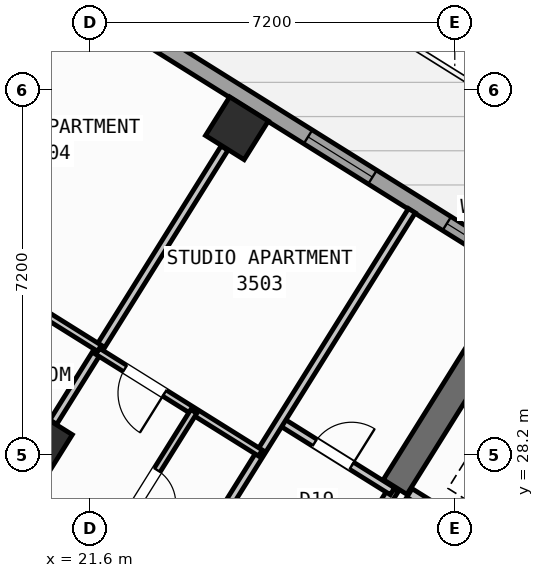
"""IFC4 building model, lengths in metres.
Left out: names, types, materials, properties, quantities, classifications, styles, units other than length and angle.
Written with IfcOpenShell. Run it as: python <this file> out.ifc"""

import sys

from ifc_helpers import new_model, si_unit, direction, frame, frame_2d, origin, origin_2d, place, context, subcontext, project, spatial, rectangle, hollow_rectangle, extrude, source, transform, mapped, element, fill, save


model = new_model("IFC4")
c1 = context("Model", 3, precision=1e-05, world=origin(), true_north=direction((0.0, 1.0)))
c2 = subcontext(c1, "Body", "Model", "MODEL_VIEW")
j1 = project(units=[si_unit("LENGTHUNIT", "METRE"), si_unit("PLANEANGLEUNIT", "RADIAN")], contexts=[c1])
p1 = place(None, origin())
s1 = spatial("IfcSite", under=j1, at=p1, CompositionType="ELEMENT")
p2 = place(p1, origin())
s2 = spatial("IfcBuilding", under=s1, at=p2, CompositionType="ELEMENT")
p3 = place(p2, frame((0.0, 0.0, 140.7)))
s3 = spatial("IfcBuildingStorey", under=s2, at=p3, CompositionType="ELEMENT", Elevation=140.7)
p4 = place(p3, frame((29.517, 30.594, 0.0), z_axis=(0.0, 0.0, 1.0), x_axis=(-0.529906864564, -0.848055844204, 0.0)))
e1 = element("IfcWall", 1, at=p4, inside=s3, PredefinedType="SHEAR", context=c2, shape_type="SweptSolid", body=[
    extrude(rectangle(XDim=3.575, YDim=0.55, at=frame_2d((1.788, 0.0))), origin(), (0.0, 0.0, 1.0), 3.35),
])
m1 = source(origin(), c2, "Body", "SweptSolid", [
    extrude(hollow_rectangle(XDim=0.9, YDim=0.9, WallThickness=0.036, at=origin_2d()), origin(), (0.0, 0.0, 1.0), 3.6),
])
for number, where, z_axis, x_axis in (
    (2, (24.5, 34.643, 0.0), (0.0, 0.0, 1.0), (-0.848, 0.53, 0.0)),
    (3, (20.632, 28.452, 0.0), (0.0, 0.0, 1.0), (-0.848, 0.53, 0.0)),
):
    element("IfcColumn", number, at=place(p3, frame(where, z_axis=z_axis, x_axis=x_axis)), inside=s3, PredefinedType="COLUMN", context=c2, shape_type="MappedRepresentation", body=[
        mapped(m1, transform((0.0, 0.0, 0.0), scale=1.0)),
    ])
p5 = place(p3, frame((14.138, 41.825, 0.0), z_axis=(0.0, 0.0, 1.0), x_axis=(0.848046498049, -0.529921821731, 0.0)))
e4 = element("IfcWall", 4, at=p5, inside=s3, PredefinedType="STANDARD", context=c2, shape_type="SweptSolid", body=[
    extrude(rectangle(XDim=31.588, YDim=0.32, at=frame_2d((15.794, 0.0))), origin(), (0.0, 0.0, 1.0), 3.35),
])
p6 = place(p5, frame((2.949, 0.0, 0.0)))
e5 = element("IfcOpeningElement", 5, at=p6, cuts=e4, PredefinedType="OPENING", context=c2, shape_type="SweptSolid", body=[
    extrude(rectangle(XDim=1.05, YDim=2.15, at=frame_2d((0.525, 1.075))), frame((0.0, 0.17, 0.0), z_axis=(0.0, -1.0, 0.0), x_axis=(1.0, 0.0, 0.0)), (0.0, 0.0, 1.0), 0.34),
])
p7 = place(p5, frame((0.861, 0.0, 0.85)))
e6 = element("IfcOpeningElement", 6, at=p7, cuts=e4, PredefinedType="OPENING", context=c2, shape_type="SweptSolid", body=[
    extrude(rectangle(XDim=1.5, YDim=1.5, at=frame_2d((0.75, 0.75))), frame((0.0, 0.17, 0.0), z_axis=(0.0, -1.0, 0.0), x_axis=(1.0, 0.0, 0.0)), (0.0, 0.0, 1.0), 0.34),
])
p8 = place(p5, frame((8.494, 0.0, 0.85)))
e7 = element("IfcOpeningElement", 7, at=p8, cuts=e4, PredefinedType="OPENING", context=c2, shape_type="SweptSolid", body=[
    extrude(rectangle(XDim=1.8, YDim=1.5, at=frame_2d((0.9, 0.75))), frame((0.0, 0.17, 0.0), z_axis=(0.0, -1.0, 0.0), x_axis=(1.0, 0.0, 0.0)), (0.0, 0.0, 1.0), 0.34),
])
p9 = place(p5, frame((13.874, 0.0, 0.85)))
e8 = element("IfcOpeningElement", 8, at=p9, cuts=e4, PredefinedType="OPENING", context=c2, shape_type="SweptSolid", body=[
    extrude(rectangle(XDim=1.5, YDim=1.5, at=frame_2d((0.75, 0.75))), frame((0.0, 0.17, 0.0), z_axis=(0.0, -1.0, 0.0), x_axis=(1.0, 0.0, 0.0)), (0.0, 0.0, 1.0), 0.34),
])
p10 = place(p5, frame((17.104, 0.0, 1.0)))
e9 = element("IfcOpeningElement", 9, at=p10, cuts=e4, PredefinedType="OPENING", context=c2, shape_type="SweptSolid", body=[
    extrude(rectangle(XDim=0.9, YDim=1.25, at=frame_2d((0.45, 0.625))), frame((0.0, 0.17, 0.0), z_axis=(0.0, -1.0, 0.0), x_axis=(1.0, 0.0, 0.0)), (0.0, 0.0, 1.0), 0.34),
])
p11 = place(p5, frame((22.144, 0.0, 1.0)))
e10 = element("IfcOpeningElement", 10, at=p11, cuts=e4, PredefinedType="OPENING", context=c2, shape_type="SweptSolid", body=[
    extrude(rectangle(XDim=0.9, YDim=1.25, at=frame_2d((0.45, 0.625))), frame((0.0, 0.17, 0.0), z_axis=(0.0, -1.0, 0.0), x_axis=(1.0, 0.0, 0.0)), (0.0, 0.0, 1.0), 0.34),
])
p12 = place(p5, frame((27.744, 0.0, 1.0)))
e11 = element("IfcOpeningElement", 11, at=p12, cuts=e4, PredefinedType="OPENING", context=c2, shape_type="SweptSolid", body=[
    extrude(rectangle(XDim=0.9, YDim=1.25, at=frame_2d((0.45, 0.625))), frame((0.0, 0.17, 0.0), z_axis=(0.0, -1.0, 0.0), x_axis=(1.0, 0.0, 0.0)), (0.0, 0.0, 1.0), 0.34),
])
p13 = place(p3, frame((31.822, 24.998, 0.0), z_axis=(0.0, 0.0, 1.0), x_axis=(-0.848036912365, 0.52993716162, 0.0)))
e12 = element("IfcWall", 12, at=p13, inside=s3, PredefinedType="STANDARD", context=c2, shape_type="SweptSolid", body=[
    extrude(rectangle(XDim=4.618, YDim=0.2, at=frame_2d((2.309, 0.0))), origin(), (0.0, 0.0, 1.0), 3.34),
])
p14 = place(p3, frame((27.596, 27.52, 0.0), z_axis=(0.0, 0.0, 1.0), x_axis=(-0.529865479138, -0.848081702443, 0.0)))
e13 = element("IfcWall", 13, at=p14, inside=s3, PredefinedType="STANDARD", context=c2, shape_type="SweptSolid", body=[
    extrude(rectangle(XDim=2.96, YDim=0.2, at=frame_2d((1.48, 0.0))), origin(), (0.0, 0.0, 1.0), 3.34),
])
p15 = place(p14, frame((1.76, 0.0, 0.0)))
e14 = element("IfcOpeningElement", 14, at=p15, cuts=e13, PredefinedType="OPENING", context=c2, shape_type="SweptSolid", body=[
    extrude(rectangle(XDim=0.86, YDim=2.05, at=frame_2d((0.43, 1.025))), frame((0.0, 0.11, 0.0), z_axis=(0.0, -1.0, 0.0), x_axis=(1.0, 0.0, 0.0)), (0.0, 0.0, 1.0), 0.22),
])
p16 = place(p3, frame((27.57, 27.478, 0.0), z_axis=(0.0, 0.0, 1.0), x_axis=(-0.848050851465, 0.529914854792, 0.0)))
e15 = element("IfcWall", 15, at=p16, inside=s3, PredefinedType="PARTITIONING", context=c2, shape_type="SweptSolid", body=[
    extrude(rectangle(XDim=2.61, YDim=0.16, at=frame_2d((1.305, 0.0))), origin(), (0.0, 0.0, 1.0), 3.34),
])
p17 = place(p16, frame((0.95, 0.0, 0.0)))
e16 = element("IfcOpeningElement", 16, at=p17, cuts=e15, PredefinedType="OPENING", context=c2, shape_type="SweptSolid", body=[
    extrude(rectangle(XDim=0.86, YDim=2.05, at=frame_2d((0.43, 1.025))), frame((0.0, 0.09, 0.0), z_axis=(0.0, -1.0, 0.0), x_axis=(1.0, 0.0, 0.0)), (0.0, 0.0, 1.0), 0.18),
])
p18 = place(p3, frame((27.953, 33.016, 0.0), z_axis=(0.0, 0.0, 1.0), x_axis=(-0.529903001606, -0.848058257957, 0.0)))
e17 = element("IfcWall", 17, at=p18, inside=s3, PredefinedType="PARTITIONING", context=c2, shape_type="SweptSolid", body=[
    extrude(rectangle(XDim=9.15, YDim=0.16, at=frame_2d((4.575, 0.0))), origin(), (0.0, 0.0, 1.0), 3.34),
])
p19 = place(p3, frame((23.104, 25.256, 0.0), z_axis=(0.0, 0.0, 1.0), x_axis=(-0.848041752158, 0.529929416617, 0.0)))
e18 = element("IfcWall", 18, at=p19, inside=s3, PredefinedType="PARTITIONING", context=c2, shape_type="SweptSolid", body=[
    extrude(rectangle(XDim=16.73, YDim=0.16, at=frame_2d((8.365, 0.0))), origin(), (0.0, 0.0, 1.0), 3.34),
])
p20 = place(p19, frame((2.22, 0.0, 0.0)))
e19 = element("IfcOpeningElement", 19, at=p20, cuts=e18, PredefinedType="OPENING", context=c2, shape_type="SweptSolid", body=[
    extrude(rectangle(XDim=0.86, YDim=2.05, at=frame_2d((0.43, 1.025))), frame((0.0, 0.09, 0.0), z_axis=(0.0, -1.0, 0.0), x_axis=(1.0, 0.0, 0.0)), (0.0, 0.0, 1.0), 0.18),
])
p21 = place(p19, frame((12.084, 0.0, 0.0)))
e20 = element("IfcOpeningElement", 20, at=p21, cuts=e18, PredefinedType="OPENING", context=c2, shape_type="SweptSolid", body=[
    extrude(rectangle(XDim=1.0, YDim=2.1, at=frame_2d((0.5, 1.05))), frame((0.0, 0.09, 0.0), z_axis=(0.0, -1.0, 0.0), x_axis=(1.0, 0.0, 0.0)), (0.0, 0.0, 1.0), 0.18),
])
p22 = place(p3, frame((21.938, 23.391, 0.0), z_axis=(0.0, 0.0, 1.0), x_axis=(-0.848045850158, 0.529922858565, 0.0)))
e21 = element("IfcWall", 21, at=p22, inside=s3, PredefinedType="PARTITIONING", context=c2, shape_type="SweptSolid", body=[
    extrude(rectangle(XDim=16.73, YDim=0.16, at=frame_2d((8.365, 0.0))), origin(), (0.0, 0.0, 1.0), 3.34),
])
p23 = place(p22, frame((2.22, 0.0, 0.0)))
e22 = element("IfcOpeningElement", 22, at=p23, cuts=e21, PredefinedType="OPENING", context=c2, shape_type="SweptSolid", body=[
    extrude(rectangle(XDim=0.86, YDim=2.05, at=frame_2d((0.43, 1.025))), frame((0.0, 0.09, 0.0), z_axis=(0.0, -1.0, 0.0), x_axis=(1.0, 0.0, 0.0)), (0.0, 0.0, 1.0), 0.18),
])
p24 = place(p22, frame((14.22, 0.0, 0.0)))
e23 = element("IfcOpeningElement", 23, at=p24, cuts=e21, PredefinedType="OPENING", context=c2, shape_type="SweptSolid", body=[
    extrude(rectangle(XDim=1.0, YDim=2.1, at=frame_2d((0.5, 1.05))), frame((0.0, 0.09, 0.0), z_axis=(0.0, -1.0, 0.0), x_axis=(1.0, 0.0, 0.0)), (0.0, 0.0, 1.0), 0.18),
])
p25 = place(p3, frame((24.256, 34.251, 0.0), z_axis=(0.0, 0.0, 1.0), x_axis=(-0.529919772691, -0.848047778437, 0.0)))
e24 = element("IfcWall", 24, at=p25, inside=s3, PredefinedType="PARTITIONING", context=c2, shape_type="SweptSolid", body=[
    extrude(rectangle(XDim=6.376, YDim=0.16, at=frame_2d((3.188, 0.0))), origin(), (0.0, 0.0, 1.0), 2.775),
])
p26 = place(p3, frame((24.964, 28.233, 0.0), z_axis=(0.0, 0.0, 1.0), x_axis=(-0.848059820872, 0.529900500304, 0.0)))
e25 = element("IfcWall", 25, at=p26, inside=s3, PredefinedType="PLUMBINGWALL", context=c2, shape_type="SweptSolid", body=[
    extrude(rectangle(XDim=3.79, YDim=0.14, at=frame_2d((1.895, 0.0))), origin(), (0.0, 0.0, 1.0), 3.34),
])
p27 = place(p26, frame((2.23, 0.0, 0.0)))
e26 = element("IfcOpeningElement", 26, at=p27, cuts=e25, PredefinedType="OPENING", context=c2, shape_type="SweptSolid", body=[
    extrude(rectangle(XDim=0.92, YDim=2.08, at=frame_2d((0.46, 1.04))), frame((0.0, 0.08, 0.0), z_axis=(0.0, -1.0, 0.0), x_axis=(1.0, 0.0, 0.0)), (0.0, 0.0, 1.0), 0.16),
])
p28 = place(p3, frame((23.65, 29.054, 0.0), z_axis=(0.0, 0.0, 1.0), x_axis=(-0.529898896701, -0.848060822863, 0.0)))
e27 = element("IfcWall", 27, at=p28, inside=s3, PredefinedType="PLUMBINGWALL", context=c2, shape_type="SweptSolid", body=[
    extrude(rectangle(XDim=3.51, YDim=0.14, at=frame_2d((1.755, 0.0))), origin(), (0.0, 0.0, 1.0), 2.995),
])
p29 = place(p28, frame((1.365, 0.0, 0.0)))
e28 = element("IfcOpeningElement", 28, at=p29, cuts=e27, PredefinedType="OPENING", context=c2, shape_type="SweptSolid", body=[
    extrude(rectangle(XDim=0.78, YDim=2.05, at=frame_2d((0.39, 1.025))), frame((0.0, 0.08, 0.0), z_axis=(0.0, -1.0, 0.0), x_axis=(1.0, 0.0, 0.0)), (0.0, 0.0, 1.0), 0.16),
])
p30 = place(p3, frame((21.787, 30.301, 0.0), z_axis=(0.0, 0.0, 1.0), x_axis=(-0.848043949058, 0.52992590092, 0.0)))
e29 = element("IfcWall", 29, at=p30, inside=s3, PredefinedType="PLUMBINGWALL", context=c2, shape_type="SweptSolid", body=[
    extrude(rectangle(XDim=12.92, YDim=0.14, at=frame_2d((6.46, 0.0))), origin(), (0.0, 0.0, 1.0), 3.34),
])
p31 = place(p30, frame((5.849, 0.0, 0.0)))
e30 = element("IfcOpeningElement", 30, at=p31, cuts=e29, PredefinedType="OPENING", context=c2, shape_type="SweptSolid", body=[
    extrude(rectangle(XDim=0.92, YDim=2.08, at=frame_2d((0.46, 1.04))), frame((0.0, 0.08, 0.0), z_axis=(0.0, -1.0, 0.0), x_axis=(1.0, 0.0, 0.0)), (0.0, 0.0, 1.0), 0.16),
])
m2 = source(origin(), c2, "Body", "SweptSolid", [
    extrude(rectangle(XDim=1.5, YDim=1.5, at=frame_2d((0.75, 0.75))), frame((0.0, 0.03, 0.0), z_axis=(0.0, -1.0, 0.0), x_axis=(1.0, 0.0, 0.0)), (0.0, 0.0, 1.0), 0.06),
])
p32 = place(p9, origin())
e31 = element("IfcWindow", 31, at=p32, inside=s3, PartitioningType="SINGLE_PANEL", PredefinedType="WINDOW", context=c2, shape_type="MappedRepresentation", body=[
    mapped(m2, transform((0.0, 0.0, 0.0), scale=1.0)),
])
fill(e8, e31)
m3 = source(origin(), c2, "Body", "SweptSolid", [
    extrude(rectangle(XDim=0.9, YDim=1.25, at=frame_2d((0.45, 0.625))), frame((0.0, 0.03, 0.0), z_axis=(0.0, -1.0, 0.0), x_axis=(1.0, 0.0, 0.0)), (0.0, 0.0, 1.0), 0.06),
])
p33 = place(p10, origin())
e32 = element("IfcWindow", 32, at=p33, inside=s3, PartitioningType="SINGLE_PANEL", PredefinedType="WINDOW", context=c2, shape_type="MappedRepresentation", body=[
    mapped(m3, transform((0.0, 0.0, 0.0), scale=1.0)),
])
fill(e9, e32)
m4 = source(origin(), c2, "Body", "SweptSolid", [
    extrude(rectangle(XDim=0.86, YDim=2.05, at=frame_2d((0.43, 1.025))), frame((0.0, 0.025, 0.0), z_axis=(0.0, -1.0, 0.0), x_axis=(1.0, 0.0, 0.0)), (0.0, 0.0, 1.0), 0.05),
])
p34 = place(p17, frame((0.86, 0.0, 0.0), z_axis=(0.0, 0.0, 1.0), x_axis=(-1.0, 0.0, 0.0)))
e33 = element("IfcDoor", 33, at=p34, inside=s3, OperationType="SINGLE_SWING_RIGHT", PredefinedType="DOOR", context=c2, shape_type="MappedRepresentation", body=[
    mapped(m4, transform((0.0, 0.0, 0.0), scale=1.0)),
])
fill(e16, e33)
m5 = source(origin(), c2, "Body", "SweptSolid", [
    extrude(rectangle(XDim=0.92, YDim=2.08, at=frame_2d((0.46, 1.04))), frame((0.0, 0.025, 0.0), z_axis=(0.0, -1.0, 0.0), x_axis=(1.0, 0.0, 0.0)), (0.0, 0.0, 1.0), 0.05),
])
p35 = place(p27, origin())
e34 = element("IfcDoor", 34, at=p35, inside=s3, OperationType="SINGLE_SWING_LEFT", PredefinedType="DOOR", context=c2, shape_type="MappedRepresentation", body=[
    mapped(m5, transform((0.0, 0.0, 0.0), scale=1.0)),
])
fill(e26, e34)
m6 = source(origin(), c2, "Body", "SweptSolid", [
    extrude(rectangle(XDim=0.78, YDim=2.05, at=frame_2d((0.39, 1.025))), frame((0.0, 0.025, 0.0), z_axis=(0.0, -1.0, 0.0), x_axis=(1.0, 0.0, 0.0)), (0.0, 0.0, 1.0), 0.05),
])
p36 = place(p29, origin())
e35 = element("IfcDoor", 35, at=p36, inside=s3, OperationType="SINGLE_SWING_RIGHT", PredefinedType="DOOR", context=c2, shape_type="MappedRepresentation", body=[
    mapped(m6, transform((0.0, 0.0, 0.0), scale=1.0)),
])
fill(e28, e35)
save(model, sys.argv[1])
